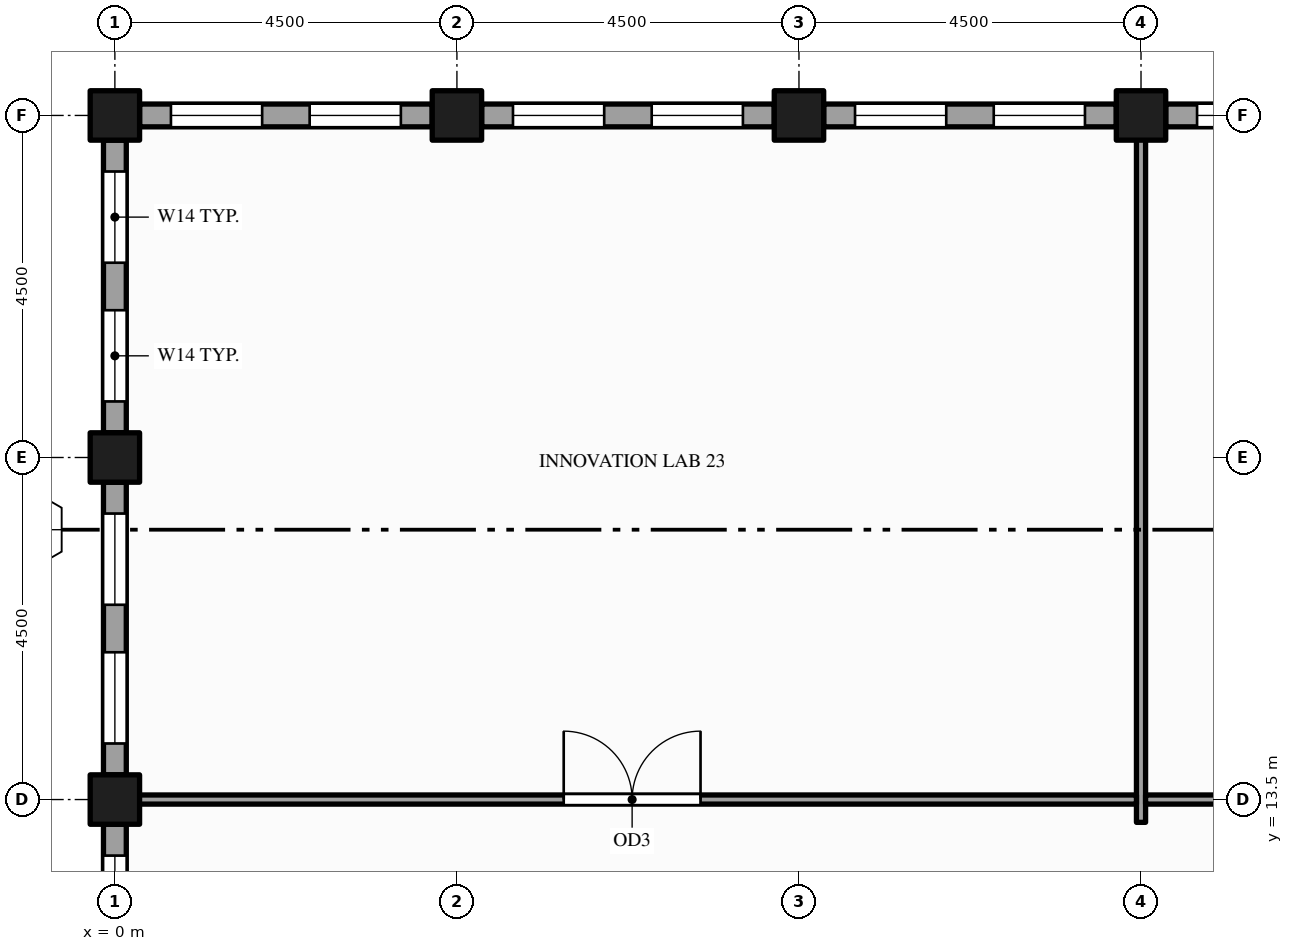
"""IFC4 building model, lengths in metres.
Left out: names, types, materials, properties, quantities, classifications, styles, units other than length and angle.
Written with IfcOpenShell. Run it as: python <this file> out.ifc"""

import sys

from ifc_helpers import new_model, si_unit, direction, frame, frame_2d, origin, origin_2d, place, context, subcontext, project, spatial, rectangle, hollow_rectangle, extrude, element, fill, save


model = new_model("IFC4")
c1 = context("Model", 3, precision=1e-05, world=origin(), true_north=direction((0.0, 1.0)))
c2 = subcontext(c1, "Body", "Model", "MODEL_VIEW")
j1 = project(units=[si_unit("LENGTHUNIT", "METRE"), si_unit("PLANEANGLEUNIT", "RADIAN")], contexts=[c1])
p1 = place(None, origin())
s1 = spatial("IfcSite", under=j1, at=p1, CompositionType="ELEMENT")
p2 = place(p1, origin())
s2 = spatial("IfcBuilding", under=s1, at=p2, CompositionType="ELEMENT")
p3 = place(p2, frame((0.0, 0.0, 261.0)))
s3 = spatial("IfcBuildingStorey", under=s2, at=p3, CompositionType="ELEMENT", Elevation=261.0)
for number, where, z_axis, x_axis in (
    (1, (0.0, 13.5, -0.15), (0.0, 0.0, 1.0), (1.0, 0.0, 0.0)),
    (2, (0.0, 18.0, -0.15), (0.0, 0.0, 1.0), (1.0, 0.0, 0.0)),
    (3, (0.0, 22.5, -0.15), (0.0, 0.0, 1.0), (1.0, 0.0, 0.0)),
    (4, (4.5, 22.5, -0.15), (0.0, 0.0, 1.0), (1.0, 0.0, 0.0)),
    (5, (9.0, 22.5, -0.15), (0.0, 0.0, 1.0), (1.0, 0.0, 0.0)),
    (6, (13.5, 22.5, -0.15), (0.0, 0.0, 1.0), (1.0, 0.0, 0.0)),
):
    element("IfcColumn", number, at=place(p3, frame(where, z_axis=z_axis, x_axis=x_axis)), inside=s3, PredefinedType="COLUMN", context=c2, shape_type="SweptSolid", body=[
        extrude(hollow_rectangle(XDim=0.65, YDim=0.65, WallThickness=0.032, at=origin_2d()), origin(), (0.0, 0.0, 1.0), 4.0),
    ])
p4 = place(p3, frame((17.675, 22.5, 0.0), z_axis=(0.0, 0.0, 1.0), x_axis=(-1.0, 0.0, 0.0)))
e7 = element("IfcWall", 7, at=p4, inside=s3, PredefinedType="STANDARD", context=c2, shape_type="SweptSolid", body=[
    extrude(rectangle(XDim=3.85, YDim=0.3, at=frame_2d((1.925, 0.0))), origin(), (0.0, 0.0, 1.0), 2.87),
])
p5 = place(p4, frame((0.413, 0.0, 0.9)))
e8 = element("IfcOpeningElement", 8, at=p5, cuts=e7, PredefinedType="OPENING", context=c2, shape_type="SweptSolid", body=[
    extrude(rectangle(XDim=1.2, YDim=1.75, at=frame_2d((0.6, 0.875))), frame((0.0, 0.16, 0.0), z_axis=(0.0, -1.0, 0.0), x_axis=(1.0, 0.0, 0.0)), (0.0, 0.0, 1.0), 0.32),
])
p6 = place(p4, frame((2.238, 0.0, 0.9)))
e9 = element("IfcOpeningElement", 9, at=p6, cuts=e7, PredefinedType="OPENING", context=c2, shape_type="SweptSolid", body=[
    extrude(rectangle(XDim=1.2, YDim=1.75, at=frame_2d((0.6, 0.875))), frame((0.0, 0.16, 0.0), z_axis=(0.0, -1.0, 0.0), x_axis=(1.0, 0.0, 0.0)), (0.0, 0.0, 1.0), 0.32),
])
p7 = place(p3, frame((13.175, 22.5, 0.0), z_axis=(0.0, 0.0, 1.0), x_axis=(-1.0, 0.0, 0.0)))
e10 = element("IfcWall", 10, at=p7, inside=s3, PredefinedType="STANDARD", context=c2, shape_type="SweptSolid", body=[
    extrude(rectangle(XDim=3.85, YDim=0.3, at=frame_2d((1.925, 0.0))), origin(), (0.0, 0.0, 1.0), 2.87),
])
p8 = place(p7, frame((0.413, 0.0, 0.9)))
e11 = element("IfcOpeningElement", 11, at=p8, cuts=e10, PredefinedType="OPENING", context=c2, shape_type="SweptSolid", body=[
    extrude(rectangle(XDim=1.2, YDim=1.75, at=frame_2d((0.6, 0.875))), frame((0.0, 0.16, 0.0), z_axis=(0.0, -1.0, 0.0), x_axis=(1.0, 0.0, 0.0)), (0.0, 0.0, 1.0), 0.32),
])
p9 = place(p7, frame((2.238, 0.0, 0.9)))
e12 = element("IfcOpeningElement", 12, at=p9, cuts=e10, PredefinedType="OPENING", context=c2, shape_type="SweptSolid", body=[
    extrude(rectangle(XDim=1.2, YDim=1.75, at=frame_2d((0.6, 0.875))), frame((0.0, 0.16, 0.0), z_axis=(0.0, -1.0, 0.0), x_axis=(1.0, 0.0, 0.0)), (0.0, 0.0, 1.0), 0.32),
])
p10 = place(p3, frame((8.675, 22.5, 0.0), z_axis=(0.0, 0.0, 1.0), x_axis=(-1.0, 0.0, 0.0)))
e13 = element("IfcWall", 13, at=p10, inside=s3, PredefinedType="STANDARD", context=c2, shape_type="SweptSolid", body=[
    extrude(rectangle(XDim=3.85, YDim=0.3, at=frame_2d((1.925, 0.0))), origin(), (0.0, 0.0, 1.0), 2.87),
])
p11 = place(p10, frame((0.413, 0.0, 0.9)))
e14 = element("IfcOpeningElement", 14, at=p11, cuts=e13, PredefinedType="OPENING", context=c2, shape_type="SweptSolid", body=[
    extrude(rectangle(XDim=1.2, YDim=1.75, at=frame_2d((0.6, 0.875))), frame((0.0, 0.16, 0.0), z_axis=(0.0, -1.0, 0.0), x_axis=(1.0, 0.0, 0.0)), (0.0, 0.0, 1.0), 0.32),
])
p12 = place(p10, frame((2.238, 0.0, 0.9)))
e15 = element("IfcOpeningElement", 15, at=p12, cuts=e13, PredefinedType="OPENING", context=c2, shape_type="SweptSolid", body=[
    extrude(rectangle(XDim=1.2, YDim=1.75, at=frame_2d((0.6, 0.875))), frame((0.0, 0.16, 0.0), z_axis=(0.0, -1.0, 0.0), x_axis=(1.0, 0.0, 0.0)), (0.0, 0.0, 1.0), 0.32),
])
p13 = place(p3, frame((4.175, 22.5, 0.0), z_axis=(0.0, 0.0, 1.0), x_axis=(-1.0, 0.0, 0.0)))
e16 = element("IfcWall", 16, at=p13, inside=s3, PredefinedType="STANDARD", context=c2, shape_type="SweptSolid", body=[
    extrude(rectangle(XDim=3.85, YDim=0.3, at=frame_2d((1.925, 0.0))), origin(), (0.0, 0.0, 1.0), 2.87),
])
p14 = place(p13, frame((0.413, 0.0, 0.9)))
e17 = element("IfcOpeningElement", 17, at=p14, cuts=e16, PredefinedType="OPENING", context=c2, shape_type="SweptSolid", body=[
    extrude(rectangle(XDim=1.2, YDim=1.75, at=frame_2d((0.6, 0.875))), frame((0.0, 0.16, 0.0), z_axis=(0.0, -1.0, 0.0), x_axis=(1.0, 0.0, 0.0)), (0.0, 0.0, 1.0), 0.32),
])
p15 = place(p13, frame((2.238, 0.0, 0.9)))
e18 = element("IfcOpeningElement", 18, at=p15, cuts=e16, PredefinedType="OPENING", context=c2, shape_type="SweptSolid", body=[
    extrude(rectangle(XDim=1.2, YDim=1.75, at=frame_2d((0.6, 0.875))), frame((0.0, 0.16, 0.0), z_axis=(0.0, -1.0, 0.0), x_axis=(1.0, 0.0, 0.0)), (0.0, 0.0, 1.0), 0.32),
])
p16 = place(p3, frame((0.0, 22.175, 0.0), z_axis=(0.0, 0.0, 1.0), x_axis=(0.0, -1.0, 0.0)))
e19 = element("IfcWall", 19, at=p16, inside=s3, PredefinedType="STANDARD", context=c2, shape_type="SweptSolid", body=[
    extrude(rectangle(XDim=3.85, YDim=0.3, at=frame_2d((1.925, 0.0))), origin(), (0.0, 0.0, 1.0), 3.162),
])
p17 = place(p16, frame((0.413, 0.0, 0.9)))
e20 = element("IfcOpeningElement", 20, at=p17, cuts=e19, PredefinedType="OPENING", context=c2, shape_type="SweptSolid", body=[
    extrude(rectangle(XDim=1.2, YDim=2.0, at=frame_2d((0.6, 1.0))), frame((0.0, 0.16, 0.0), z_axis=(0.0, -1.0, 0.0), x_axis=(1.0, 0.0, 0.0)), (0.0, 0.0, 1.0), 0.32),
])
p18 = place(p16, frame((2.238, 0.0, 0.9)))
e21 = element("IfcOpeningElement", 21, at=p18, cuts=e19, PredefinedType="OPENING", context=c2, shape_type="SweptSolid", body=[
    extrude(rectangle(XDim=1.2, YDim=2.0, at=frame_2d((0.6, 1.0))), frame((0.0, 0.16, 0.0), z_axis=(0.0, -1.0, 0.0), x_axis=(1.0, 0.0, 0.0)), (0.0, 0.0, 1.0), 0.32),
])
p19 = place(p3, frame((0.0, 17.675, 0.0), z_axis=(0.0, 0.0, 1.0), x_axis=(0.0, -1.0, 0.0)))
e22 = element("IfcWall", 22, at=p19, inside=s3, PredefinedType="STANDARD", context=c2, shape_type="SweptSolid", body=[
    extrude(rectangle(XDim=3.85, YDim=0.3, at=frame_2d((1.925, 0.0))), origin(), (0.0, 0.0, 1.0), 3.162),
])
p20 = place(p19, frame((0.413, 0.0, 0.9)))
e23 = element("IfcOpeningElement", 23, at=p20, cuts=e22, PredefinedType="OPENING", context=c2, shape_type="SweptSolid", body=[
    extrude(rectangle(XDim=1.2, YDim=2.0, at=frame_2d((0.6, 1.0))), frame((0.0, 0.16, 0.0), z_axis=(0.0, -1.0, 0.0), x_axis=(1.0, 0.0, 0.0)), (0.0, 0.0, 1.0), 0.32),
])
p21 = place(p19, frame((2.238, 0.0, 0.9)))
e24 = element("IfcOpeningElement", 24, at=p21, cuts=e22, PredefinedType="OPENING", context=c2, shape_type="SweptSolid", body=[
    extrude(rectangle(XDim=1.2, YDim=2.0, at=frame_2d((0.6, 1.0))), frame((0.0, 0.16, 0.0), z_axis=(0.0, -1.0, 0.0), x_axis=(1.0, 0.0, 0.0)), (0.0, 0.0, 1.0), 0.32),
])
p22 = place(p3, frame((0.0, 13.175, 0.0), z_axis=(0.0, 0.0, 1.0), x_axis=(0.0, -1.0, 0.0)))
e25 = element("IfcWall", 25, at=p22, inside=s3, PredefinedType="STANDARD", context=c2, shape_type="SweptSolid", body=[
    extrude(rectangle(XDim=3.85, YDim=0.3, at=frame_2d((1.925, 0.0))), origin(), (0.0, 0.0, 1.0), 3.162),
])
p23 = place(p22, frame((0.413, 0.0, 0.9)))
e26 = element("IfcOpeningElement", 26, at=p23, cuts=e25, PredefinedType="OPENING", context=c2, shape_type="SweptSolid", body=[
    extrude(rectangle(XDim=1.2, YDim=2.0, at=frame_2d((0.6, 1.0))), frame((0.0, 0.16, 0.0), z_axis=(0.0, -1.0, 0.0), x_axis=(1.0, 0.0, 0.0)), (0.0, 0.0, 1.0), 0.32),
])
p24 = place(p22, frame((2.238, 0.0, 0.9)))
e27 = element("IfcOpeningElement", 27, at=p24, cuts=e25, PredefinedType="OPENING", context=c2, shape_type="SweptSolid", body=[
    extrude(rectangle(XDim=1.2, YDim=2.0, at=frame_2d((0.6, 1.0))), frame((0.0, 0.16, 0.0), z_axis=(0.0, -1.0, 0.0), x_axis=(1.0, 0.0, 0.0)), (0.0, 0.0, 1.0), 0.32),
])
p25 = place(p3, frame((13.5, 13.2, 0.0), z_axis=(0.0, 0.0, 1.0), x_axis=(0.0, 1.0, 0.0)))
e28 = element("IfcWall", 28, at=p25, inside=s3, PredefinedType="PARTITIONING", context=c2, shape_type="SweptSolid", body=[
    extrude(rectangle(XDim=9.15, YDim=0.12, at=frame_2d((4.575, 0.0))), origin(), (0.0, 0.0, 1.0), 2.87),
])
p26 = place(p3, frame((0.15, 13.5, 0.0), z_axis=(0.0, 0.0, 1.0), x_axis=(1.0, 0.0, 0.0)))
e29 = element("IfcWall", 29, at=p26, inside=s3, PredefinedType="PARTITIONING", context=c2, shape_type="SweptSolid", body=[
    extrude(rectangle(XDim=13.29, YDim=0.12, at=frame_2d((6.645, 0.0))), origin(), (0.0, 0.0, 1.0), 2.87),
])
p27 = place(p26, frame((5.755, 0.0, 0.0)))
e30 = element("IfcOpeningElement", 30, at=p27, cuts=e29, PredefinedType="OPENING", context=c2, shape_type="SweptSolid", body=[
    extrude(rectangle(XDim=1.8, YDim=2.1, at=frame_2d((0.9, 1.05))), frame((0.0, 0.07, 0.0), z_axis=(0.0, -1.0, 0.0), x_axis=(1.0, 0.0, 0.0)), (0.0, 0.0, 1.0), 0.14),
])
p28 = place(p3, frame((13.56, 13.5, 0.0), z_axis=(0.0, 0.0, 1.0), x_axis=(1.0, 0.0, 0.0)))
e31 = element("IfcWall", 31, at=p28, inside=s3, PredefinedType="PARTITIONING", context=c2, shape_type="SweptSolid", body=[
    extrude(rectangle(XDim=4.38, YDim=0.12, at=frame_2d((2.19, 0.0))), origin(), (0.0, 0.0, 1.0), 2.87),
])
p29 = place(p28, frame((1.74, 0.0, 0.0)))
e32 = element("IfcOpeningElement", 32, at=p29, cuts=e31, PredefinedType="OPENING", context=c2, shape_type="SweptSolid", body=[
    extrude(rectangle(XDim=0.9, YDim=2.1, at=frame_2d((0.45, 1.05))), frame((0.0, 0.07, 0.0), z_axis=(0.0, -1.0, 0.0), x_axis=(1.0, 0.0, 0.0)), (0.0, 0.0, 1.0), 0.14),
])
p30 = place(p6, origin())
e33 = element("IfcWindow", 33, at=p30, inside=s3, PartitioningType="SINGLE_PANEL", PredefinedType="WINDOW", context=c2, shape_type="SweptSolid", body=[
    extrude(rectangle(XDim=1.2, YDim=1.75, at=frame_2d((0.6, 0.875))), frame((0.0, 0.03, 0.0), z_axis=(0.0, -1.0, 0.0), x_axis=(1.0, 0.0, 0.0)), (0.0, 0.0, 1.0), 0.06),
])
fill(e9, e33)
p31 = place(p8, origin())
e34 = element("IfcWindow", 34, at=p31, inside=s3, PartitioningType="SINGLE_PANEL", PredefinedType="WINDOW", context=c2, shape_type="SweptSolid", body=[
    extrude(rectangle(XDim=1.2, YDim=1.75, at=frame_2d((0.6, 0.875))), frame((0.0, 0.03, 0.0), z_axis=(0.0, -1.0, 0.0), x_axis=(1.0, 0.0, 0.0)), (0.0, 0.0, 1.0), 0.06),
])
fill(e11, e34)
p32 = place(p9, origin())
e35 = element("IfcWindow", 35, at=p32, inside=s3, PartitioningType="SINGLE_PANEL", PredefinedType="WINDOW", context=c2, shape_type="SweptSolid", body=[
    extrude(rectangle(XDim=1.2, YDim=1.75, at=frame_2d((0.6, 0.875))), frame((0.0, 0.03, 0.0), z_axis=(0.0, -1.0, 0.0), x_axis=(1.0, 0.0, 0.0)), (0.0, 0.0, 1.0), 0.06),
])
fill(e12, e35)
p33 = place(p11, origin())
e36 = element("IfcWindow", 36, at=p33, inside=s3, PartitioningType="SINGLE_PANEL", PredefinedType="WINDOW", context=c2, shape_type="SweptSolid", body=[
    extrude(rectangle(XDim=1.2, YDim=1.75, at=frame_2d((0.6, 0.875))), frame((0.0, 0.03, 0.0), z_axis=(0.0, -1.0, 0.0), x_axis=(1.0, 0.0, 0.0)), (0.0, 0.0, 1.0), 0.06),
])
fill(e14, e36)
p34 = place(p12, origin())
e37 = element("IfcWindow", 37, at=p34, inside=s3, PartitioningType="SINGLE_PANEL", PredefinedType="WINDOW", context=c2, shape_type="SweptSolid", body=[
    extrude(rectangle(XDim=1.2, YDim=1.75, at=frame_2d((0.6, 0.875))), frame((0.0, 0.03, 0.0), z_axis=(0.0, -1.0, 0.0), x_axis=(1.0, 0.0, 0.0)), (0.0, 0.0, 1.0), 0.06),
])
fill(e15, e37)
p35 = place(p14, origin())
e38 = element("IfcWindow", 38, at=p35, inside=s3, PartitioningType="SINGLE_PANEL", PredefinedType="WINDOW", context=c2, shape_type="SweptSolid", body=[
    extrude(rectangle(XDim=1.2, YDim=1.75, at=frame_2d((0.6, 0.875))), frame((0.0, 0.03, 0.0), z_axis=(0.0, -1.0, 0.0), x_axis=(1.0, 0.0, 0.0)), (0.0, 0.0, 1.0), 0.06),
])
fill(e17, e38)
p36 = place(p15, origin())
e39 = element("IfcWindow", 39, at=p36, inside=s3, PartitioningType="SINGLE_PANEL", PredefinedType="WINDOW", context=c2, shape_type="SweptSolid", body=[
    extrude(rectangle(XDim=1.2, YDim=1.75, at=frame_2d((0.6, 0.875))), frame((0.0, 0.03, 0.0), z_axis=(0.0, -1.0, 0.0), x_axis=(1.0, 0.0, 0.0)), (0.0, 0.0, 1.0), 0.06),
])
fill(e18, e39)
p37 = place(p17, origin())
e40 = element("IfcWindow", 40, at=p37, inside=s3, PartitioningType="SINGLE_PANEL", PredefinedType="WINDOW", context=c2, shape_type="SweptSolid", body=[
    extrude(rectangle(XDim=1.2, YDim=2.0, at=frame_2d((0.6, 1.0))), frame((0.0, 0.03, 0.0), z_axis=(0.0, -1.0, 0.0), x_axis=(1.0, 0.0, 0.0)), (0.0, 0.0, 1.0), 0.06),
])
fill(e20, e40)
p38 = place(p18, origin())
e41 = element("IfcWindow", 41, at=p38, inside=s3, PartitioningType="SINGLE_PANEL", PredefinedType="WINDOW", context=c2, shape_type="SweptSolid", body=[
    extrude(rectangle(XDim=1.2, YDim=2.0, at=frame_2d((0.6, 1.0))), frame((0.0, 0.03, 0.0), z_axis=(0.0, -1.0, 0.0), x_axis=(1.0, 0.0, 0.0)), (0.0, 0.0, 1.0), 0.06),
])
fill(e21, e41)
p39 = place(p20, origin())
e42 = element("IfcWindow", 42, at=p39, inside=s3, PartitioningType="SINGLE_PANEL", PredefinedType="WINDOW", context=c2, shape_type="SweptSolid", body=[
    extrude(rectangle(XDim=1.2, YDim=2.0, at=frame_2d((0.6, 1.0))), frame((0.0, 0.03, 0.0), z_axis=(0.0, -1.0, 0.0), x_axis=(1.0, 0.0, 0.0)), (0.0, 0.0, 1.0), 0.06),
])
fill(e23, e42)
p40 = place(p21, origin())
e43 = element("IfcWindow", 43, at=p40, inside=s3, PartitioningType="SINGLE_PANEL", PredefinedType="WINDOW", context=c2, shape_type="SweptSolid", body=[
    extrude(rectangle(XDim=1.2, YDim=2.0, at=frame_2d((0.6, 1.0))), frame((0.0, 0.03, 0.0), z_axis=(0.0, -1.0, 0.0), x_axis=(1.0, 0.0, 0.0)), (0.0, 0.0, 1.0), 0.06),
])
fill(e24, e43)
p41 = place(p23, origin())
e44 = element("IfcWindow", 44, at=p41, inside=s3, PartitioningType="SINGLE_PANEL", PredefinedType="WINDOW", context=c2, shape_type="SweptSolid", body=[
    extrude(rectangle(XDim=1.2, YDim=2.0, at=frame_2d((0.6, 1.0))), frame((0.0, 0.03, 0.0), z_axis=(0.0, -1.0, 0.0), x_axis=(1.0, 0.0, 0.0)), (0.0, 0.0, 1.0), 0.06),
])
fill(e26, e44)
p42 = place(p27, origin())
e45 = element("IfcDoor", 45, at=p42, inside=s3, OperationType="DOUBLE_DOOR_SINGLE_SWING", PredefinedType="DOOR", context=c2, shape_type="SweptSolid", body=[
    extrude(rectangle(XDim=1.8, YDim=2.1, at=frame_2d((0.9, 1.05))), frame((0.0, 0.025, 0.0), z_axis=(0.0, -1.0, 0.0), x_axis=(1.0, 0.0, 0.0)), (0.0, 0.0, 1.0), 0.05),
])
fill(e30, e45)
save(model, sys.argv[1])
